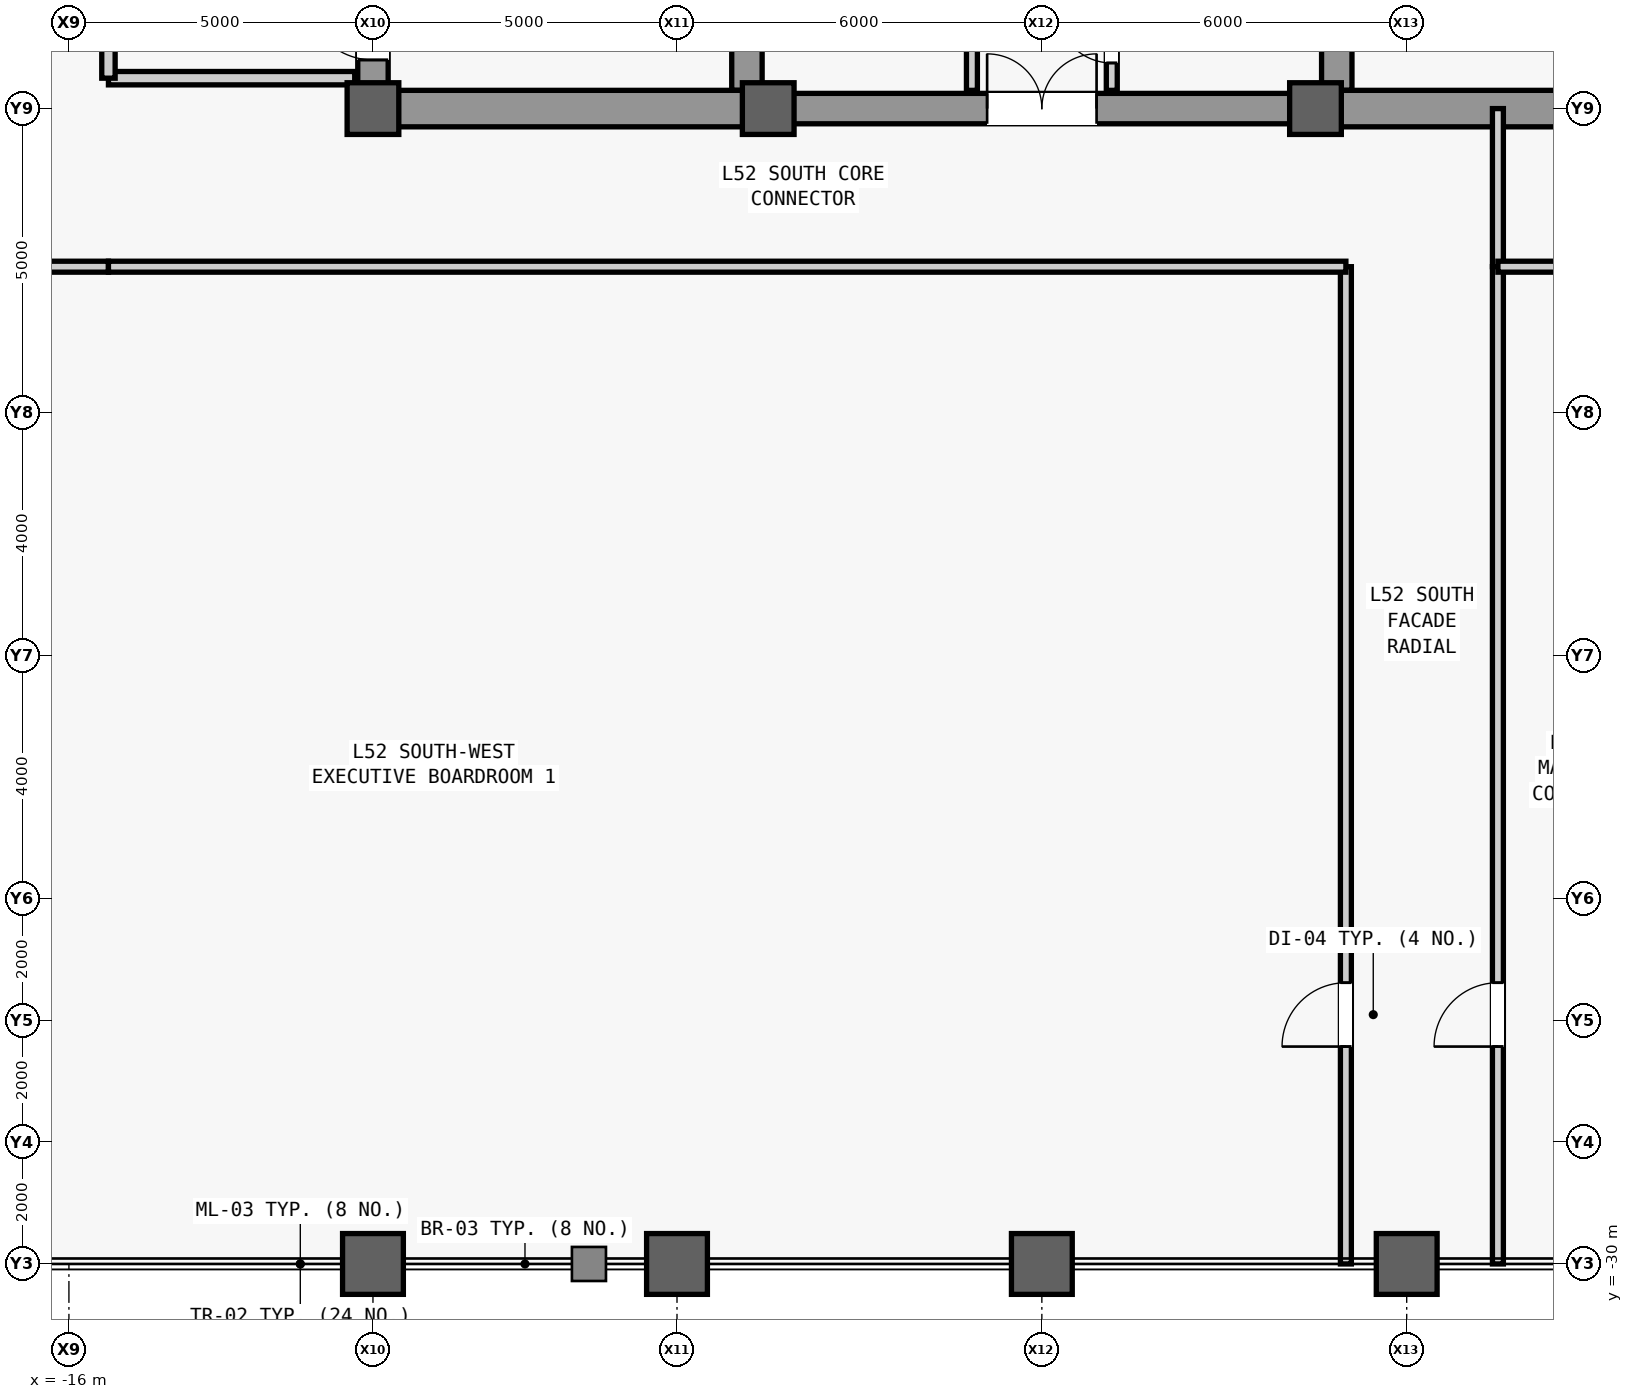
"""IFC4 building model, lengths in metres.
Left out: names, types, materials, properties, quantities, classifications, styles, units other than length and angle.
Written with IfcOpenShell. Run it as: python <this file> out.ifc"""

import sys

from ifc_helpers import new_model, si_unit, direction, frame, frame_2d, origin, origin_2d, place, context, subcontext, project, spatial, rectangle, hollow_rectangle, extrude, source, transform, mapped, element, fill, save


model = new_model("IFC4")
c1 = context("Model", 3, precision=1e-05, world=origin(), true_north=direction((0.0, 1.0)))
c2 = subcontext(c1, "Body", "Model", "MODEL_VIEW")
j1 = project(units=[si_unit("LENGTHUNIT", "METRE"), si_unit("PLANEANGLEUNIT", "RADIAN")], contexts=[c1])
p1 = place(None, origin())
s1 = spatial("IfcSite", under=j1, at=p1, CompositionType="ELEMENT")
p2 = place(p1, origin())
s2 = spatial("IfcBuilding", under=s1, at=p2, CompositionType="ELEMENT")
p3 = place(p2, frame((0.0, 0.0, 223.1)))
s3 = spatial("IfcBuildingStorey", under=s2, at=p3, CompositionType="ELEMENT", Elevation=223.1)
m1 = source(origin(), c2, "Body", "SweptSolid", [
    extrude(rectangle(XDim=22.0, YDim=0.5, at=frame_2d((11.0, 0.0))), origin(), (0.0, 0.0, 1.0), 3.78),
])
p4 = place(p3, frame((-11.0, -11.0, 0.0), z_axis=(0.0, 0.0, 1.0), x_axis=(0.0, 1.0, 0.0)))
e1 = element("IfcWall", 1, at=p4, inside=s3, PredefinedType="SHEAR", context=c2, shape_type="MappedRepresentation", body=[
    mapped(m1, transform((0.0, 0.0, 0.0), scale=1.0)),
])
m2 = source(origin(), c2, "Body", "SweptSolid", [
    extrude(rectangle(XDim=1.1, YDim=2.2, at=frame_2d((0.55, 1.1))), frame((0.0, 0.26, 0.0), z_axis=(0.0, -1.0, 0.0), x_axis=(1.0, 0.0, 0.0)), (0.0, 0.0, 1.0), 0.52),
])
p5 = place(p4, frame((0.8, 0.0, 0.0)))
e2 = element("IfcOpeningElement", 2, at=p5, cuts=e1, PredefinedType="OPENING", context=c2, shape_type="MappedRepresentation", body=[
    mapped(m2, transform((0.0, 0.0, 0.0), scale=1.0)),
])
p6 = place(p4, frame((12.5, 0.0, 0.0)))
e3 = element("IfcOpeningElement", 3, at=p6, cuts=e1, PredefinedType="OPENING", context=c2, shape_type="MappedRepresentation", body=[
    mapped(m2, transform((0.0, 0.0, 0.0), scale=1.0)),
])
m3 = source(origin(), c2, "Body", "SweptSolid", [
    extrude(rectangle(XDim=0.9, YDim=2.15, at=frame_2d((0.45, 1.075))), frame((0.0, 0.26, 0.0), z_axis=(0.0, -1.0, 0.0), x_axis=(1.0, 0.0, 0.0)), (0.0, 0.0, 1.0), 0.52),
])
p7 = place(p4, frame((6.2, 0.0, 0.0)))
e4 = element("IfcOpeningElement", 4, at=p7, cuts=e1, PredefinedType="OPENING", context=c2, shape_type="MappedRepresentation", body=[
    mapped(m3, transform((0.0, 0.0, 0.0), scale=1.0)),
])
p8 = place(p4, frame((8.05, 0.0, 0.0)))
e5 = element("IfcOpeningElement", 5, at=p8, cuts=e1, PredefinedType="OPENING", context=c2, shape_type="MappedRepresentation", body=[
    mapped(m3, transform((0.0, 0.0, 0.0), scale=1.0)),
])
m4 = source(origin(), c2, "Body", "SweptSolid", [
    extrude(rectangle(XDim=1.3, YDim=2.3, at=frame_2d((0.65, 1.15))), frame((0.0, 0.26, 0.0), z_axis=(0.0, -1.0, 0.0), x_axis=(1.0, 0.0, 0.0)), (0.0, 0.0, 1.0), 0.52),
])
p9 = place(p4, frame((2.7, 0.0, 0.0)))
e6 = element("IfcOpeningElement", 6, at=p9, cuts=e1, PredefinedType="OPENING", context=c2, shape_type="MappedRepresentation", body=[
    mapped(m4, transform((0.0, 0.0, 0.0), scale=1.0)),
])
m5 = source(origin(), c2, "Body", "SweptSolid", [
    extrude(rectangle(XDim=21.4, YDim=0.5, at=frame_2d((10.7, 0.0))), origin(), (0.0, 0.0, 1.0), 3.78),
])
for number, where, z_axis, x_axis in (
    (7, (-4.85, -10.7, 0.0), (0.0, 0.0, 1.0), (0.0, 1.0, 0.0)),
    (8, (4.85, -10.7, 0.0), (0.0, 0.0, 1.0), (0.0, 1.0, 0.0)),
):
    element("IfcWall", number, at=place(p3, frame(where, z_axis=z_axis, x_axis=x_axis)), inside=s3, PredefinedType="SHEAR", context=c2, shape_type="MappedRepresentation", body=[
        mapped(m5, transform((0.0, 0.0, 0.0), scale=1.0)),
    ])
m6 = source(origin(), c2, "Body", "SweptSolid", [
    extrude(rectangle(XDim=5.9, YDim=0.6, at=frame_2d((2.95, 0.0))), origin(), (0.0, 0.0, 1.0), 3.78),
])
for number, where, z_axis, x_axis in (
    (9, (-10.75, -11.0, 0.0), (0.0, 0.0, 1.0), (1.0, 0.0, 0.0)),
    (10, (4.85, -11.0, 0.0), (0.0, 0.0, 1.0), (1.0, 0.0, 0.0)),
):
    element("IfcWall", number, at=place(p3, frame(where, z_axis=z_axis, x_axis=x_axis)), inside=s3, PredefinedType="SHEAR", context=c2, shape_type="MappedRepresentation", body=[
        mapped(m6, transform((0.0, 0.0, 0.0), scale=1.0)),
    ])
m7 = source(origin(), c2, "Body", "SweptSolid", [
    extrude(rectangle(XDim=9.2, YDim=0.5, at=frame_2d((4.6, 0.0))), origin(), (0.0, 0.0, 1.0), 3.78),
])
p10 = place(p3, frame((-4.6, -11.0, 0.0), z_axis=(0.0, 0.0, 1.0), x_axis=(1.0, 0.0, 0.0)))
e11 = element("IfcWall", 11, at=p10, inside=s3, PredefinedType="SHEAR", context=c2, shape_type="MappedRepresentation", body=[
    mapped(m7, transform((0.0, 0.0, 0.0), scale=1.0)),
])
m8 = source(origin(), c2, "Body", "SweptSolid", [
    extrude(rectangle(XDim=1.8, YDim=2.25, at=frame_2d((0.9, 1.125))), frame((0.0, 0.26, 0.0), z_axis=(0.0, -1.0, 0.0), x_axis=(1.0, 0.0, 0.0)), (0.0, 0.0, 1.0), 0.52),
])
p11 = place(p10, frame((3.7, 0.0, 0.0)))
e12 = element("IfcOpeningElement", 12, at=p11, cuts=e11, PredefinedType="OPENING", context=c2, shape_type="MappedRepresentation", body=[
    mapped(m8, transform((0.0, 0.0, 0.0), scale=1.0)),
])
m9 = source(origin(), c2, "Body", "SweptSolid", [
    extrude(hollow_rectangle(XDim=1.0, YDim=1.0, WallThickness=0.055, at=origin_2d()), origin(), (0.0, 0.0, 1.0), 4.0),
])
p12 = place(p3, frame((-11.0, -30.0, 0.0), z_axis=(0.0, 0.0, 1.0), x_axis=(1.0, 0.0, 0.0)))
e13 = element("IfcColumn", 13, at=p12, inside=s3, PredefinedType="COLUMN", context=c2, shape_type="MappedRepresentation", body=[
    mapped(m9, transform((0.0, 0.0, 0.0), scale=1.0)),
])
m10 = source(origin(), c2, "Body", "SweptSolid", [
    extrude(rectangle(XDim=0.85, YDim=0.85, at=origin_2d()), origin(), (0.0, 0.0, 1.0), 4.0),
])
p13 = place(p3, frame((-11.0, -11.0, 0.0), z_axis=(0.0, 0.0, 1.0), x_axis=(1.0, 0.0, 0.0)))
e14 = element("IfcColumn", 14, at=p13, inside=s3, PredefinedType="COLUMN", context=c2, shape_type="MappedRepresentation", body=[
    mapped(m10, transform((0.0, 0.0, 0.0), scale=1.0)),
])
p14 = place(p3, frame((-6.0, -30.0, 0.0), z_axis=(0.0, 0.0, 1.0), x_axis=(1.0, 0.0, 0.0)))
e15 = element("IfcColumn", 15, at=p14, inside=s3, PredefinedType="COLUMN", context=c2, shape_type="MappedRepresentation", body=[
    mapped(m9, transform((0.0, 0.0, 0.0), scale=1.0)),
])
p15 = place(p3, frame((-4.5, -11.0, 0.0), z_axis=(0.0, 0.0, 1.0), x_axis=(1.0, 0.0, 0.0)))
e16 = element("IfcColumn", 16, at=p15, inside=s3, PredefinedType="COLUMN", context=c2, shape_type="MappedRepresentation", body=[
    mapped(m10, transform((0.0, 0.0, 0.0), scale=1.0)),
])
p16 = place(p3, frame((0.0, -30.0, 0.0), z_axis=(0.0, 0.0, 1.0), x_axis=(1.0, 0.0, 0.0)))
e17 = element("IfcColumn", 17, at=p16, inside=s3, PredefinedType="COLUMN", context=c2, shape_type="MappedRepresentation", body=[
    mapped(m9, transform((0.0, 0.0, 0.0), scale=1.0)),
])
p17 = place(p3, frame((4.5, -11.0, 0.0), z_axis=(0.0, 0.0, 1.0), x_axis=(1.0, 0.0, 0.0)))
e18 = element("IfcColumn", 18, at=p17, inside=s3, PredefinedType="COLUMN", context=c2, shape_type="MappedRepresentation", body=[
    mapped(m10, transform((0.0, 0.0, 0.0), scale=1.0)),
])
p18 = place(p3, frame((6.0, -30.0, 0.0), z_axis=(0.0, 0.0, 1.0), x_axis=(1.0, 0.0, 0.0)))
e19 = element("IfcColumn", 19, at=p18, inside=s3, PredefinedType="COLUMN", context=c2, shape_type="MappedRepresentation", body=[
    mapped(m9, transform((0.0, 0.0, 0.0), scale=1.0)),
])
m11 = source(origin(), c2, "Body", "SweptSolid", [
    extrude(rectangle(XDim=4.05, YDim=0.22, at=frame_2d((2.025, 0.0))), origin(), (0.0, 0.0, 1.0), 3.78),
])
p19 = place(p3, frame((-15.35, -10.5, 0.0), z_axis=(0.0, 0.0, 1.0), x_axis=(1.0, 0.0, 0.0)))
e20 = element("IfcWall", 20, at=p19, inside=s3, PredefinedType="PARTITIONING", context=c2, shape_type="MappedRepresentation", body=[
    mapped(m11, transform((0.0, 0.0, 0.0), scale=1.0)),
])
m12 = source(origin(), c2, "Body", "SweptSolid", [
    extrude(rectangle(XDim=4.4, YDim=0.22, at=frame_2d((2.2, 0.0))), origin(), (0.0, 0.0, 1.0), 3.78),
])
p20 = place(p3, frame((-15.35, -10.5, 0.0), z_axis=(0.0, 0.0, 1.0), x_axis=(0.0, 1.0, 0.0)))
e21 = element("IfcWall", 21, at=p20, inside=s3, PredefinedType="PARTITIONING", context=c2, shape_type="MappedRepresentation", body=[
    mapped(m12, transform((0.0, 0.0, 0.0), scale=1.0)),
])
m13 = source(origin(), c2, "Body", "SweptSolid", [
    extrude(rectangle(XDim=1.2, YDim=2.2, at=frame_2d((0.6, 1.1))), frame((0.0, 0.12, 0.0), z_axis=(0.0, -1.0, 0.0), x_axis=(1.0, 0.0, 0.0)), (0.0, 0.0, 1.0), 0.24),
])
p21 = place(p20, frame((1.6, 0.0, 0.0)))
e22 = element("IfcOpeningElement", 22, at=p21, cuts=e21, PredefinedType="OPENING", context=c2, shape_type="MappedRepresentation", body=[
    mapped(m13, transform((0.0, 0.0, 0.0), scale=1.0)),
])
m14 = source(origin(), c2, "Body", "SweptSolid", [
    extrude(rectangle(XDim=5.4, YDim=0.18, at=frame_2d((2.7, 0.0))), origin(), (0.0, 0.0, 1.0), 3.78),
])
p22 = place(p3, frame((-1.15, -10.7, 0.0), z_axis=(0.0, 0.0, 1.0), x_axis=(0.0, 1.0, 0.0)))
e23 = element("IfcWall", 23, at=p22, inside=s3, PredefinedType="PARTITIONING", context=c2, shape_type="MappedRepresentation", body=[
    mapped(m14, transform((0.0, 0.0, 0.0), scale=1.0)),
])
m15 = source(origin(), c2, "Body", "SweptSolid", [
    extrude(rectangle(XDim=0.9, YDim=2.15, at=frame_2d((0.45, 1.075))), frame((0.0, 0.1, 0.0), z_axis=(0.0, -1.0, 0.0), x_axis=(1.0, 0.0, 0.0)), (0.0, 0.0, 1.0), 0.2),
])
p23 = place(p22, frame((2.25, 0.0, 0.0)))
e24 = element("IfcOpeningElement", 24, at=p23, cuts=e23, PredefinedType="OPENING", context=c2, shape_type="MappedRepresentation", body=[
    mapped(m15, transform((0.0, 0.0, 0.0), scale=1.0)),
])
p24 = place(p3, frame((1.15, -10.7, 0.0), z_axis=(0.0, 0.0, 1.0), x_axis=(0.0, 1.0, 0.0)))
e25 = element("IfcWall", 25, at=p24, inside=s3, PredefinedType="PARTITIONING", context=c2, shape_type="MappedRepresentation", body=[
    mapped(m14, transform((0.0, 0.0, 0.0), scale=1.0)),
])
p25 = place(p24, frame((0.45, 0.0, 0.0)))
e26 = element("IfcOpeningElement", 26, at=p25, cuts=e25, PredefinedType="OPENING", context=c2, shape_type="MappedRepresentation", body=[
    mapped(m15, transform((0.0, 0.0, 0.0), scale=1.0)),
])
p26 = place(p24, frame((2.25, 0.0, 0.0)))
e27 = element("IfcOpeningElement", 27, at=p26, cuts=e25, PredefinedType="OPENING", context=c2, shape_type="MappedRepresentation", body=[
    mapped(m15, transform((0.0, 0.0, 0.0), scale=1.0)),
])
p27 = place(p24, frame((4.05, 0.0, 0.0)))
e28 = element("IfcOpeningElement", 28, at=p27, cuts=e25, PredefinedType="OPENING", context=c2, shape_type="MappedRepresentation", body=[
    mapped(m15, transform((0.0, 0.0, 0.0), scale=1.0)),
])
m16 = source(origin(), c2, "Body", "SweptSolid", [
    extrude(rectangle(XDim=2.45, YDim=0.18, at=frame_2d((1.225, 0.0))), origin(), (0.0, 0.0, 1.0), 3.78),
])
p28 = place(p3, frame((-17.8, -13.6, 0.0), z_axis=(0.0, 0.0, 1.0), x_axis=(1.0, 0.0, 0.0)))
e29 = element("IfcWall", 29, at=p28, inside=s3, PredefinedType="PARTITIONING", context=c2, shape_type="MappedRepresentation", body=[
    mapped(m16, transform((0.0, 0.0, 0.0), scale=1.0)),
])
m17 = source(origin(), c2, "Body", "SweptSolid", [
    extrude(rectangle(XDim=2.6, YDim=0.18, at=frame_2d((1.3, 0.0))), origin(), (0.0, 0.0, 1.0), 3.78),
])
p29 = place(p3, frame((7.5, -13.6, 0.0), z_axis=(0.0, 0.0, 1.0), x_axis=(0.0, 1.0, 0.0)))
e30 = element("IfcWall", 30, at=p29, inside=s3, PredefinedType="PARTITIONING", context=c2, shape_type="MappedRepresentation", body=[
    mapped(m17, transform((0.0, 0.0, 0.0), scale=1.0)),
])
m18 = source(origin(), c2, "Body", "SweptSolid", [
    extrude(rectangle(XDim=16.4, YDim=0.18, at=frame_2d((8.2, 0.0))), origin(), (0.0, 0.0, 1.0), 3.78),
])
p30 = place(p3, frame((5.0, -30.0, 0.0), z_axis=(0.0, 0.0, 1.0), x_axis=(0.0, 1.0, 0.0)))
e31 = element("IfcWall", 31, at=p30, inside=s3, PredefinedType="PARTITIONING", context=c2, shape_type="MappedRepresentation", body=[
    mapped(m18, transform((0.0, 0.0, 0.0), scale=1.0)),
])
m19 = source(origin(), c2, "Body", "SweptSolid", [
    extrude(rectangle(XDim=1.05, YDim=2.2, at=frame_2d((0.525, 1.1))), frame((0.0, 0.1, 0.0), z_axis=(0.0, -1.0, 0.0), x_axis=(1.0, 0.0, 0.0)), (0.0, 0.0, 1.0), 0.2),
])
p31 = place(p30, frame((3.575, 0.0, 0.0)))
e32 = element("IfcOpeningElement", 32, at=p31, cuts=e31, PredefinedType="OPENING", context=c2, shape_type="MappedRepresentation", body=[
    mapped(m19, transform((0.0, 0.0, 0.0), scale=1.0)),
])
m20 = source(origin(), c2, "Body", "SweptSolid", [
    extrude(rectangle(XDim=20.35, YDim=0.18, at=frame_2d((10.175, 0.0))), origin(), (0.0, 0.0, 1.0), 3.78),
])
p32 = place(p3, frame((-15.35, -13.6, 0.0), z_axis=(0.0, 0.0, 1.0), x_axis=(1.0, 0.0, 0.0)))
e33 = element("IfcWall", 33, at=p32, inside=s3, PredefinedType="PARTITIONING", context=c2, shape_type="MappedRepresentation", body=[
    mapped(m20, transform((0.0, 0.0, 0.0), scale=1.0)),
])
p33 = place(p3, frame((7.5, -30.0, 0.0), z_axis=(0.0, 0.0, 1.0), x_axis=(0.0, 1.0, 0.0)))
e34 = element("IfcWall", 34, at=p33, inside=s3, PredefinedType="PARTITIONING", context=c2, shape_type="MappedRepresentation", body=[
    mapped(m18, transform((0.0, 0.0, 0.0), scale=1.0)),
])
p34 = place(p33, frame((3.575, 0.0, 0.0)))
e35 = element("IfcOpeningElement", 35, at=p34, cuts=e34, PredefinedType="OPENING", context=c2, shape_type="MappedRepresentation", body=[
    mapped(m19, transform((0.0, 0.0, 0.0), scale=1.0)),
])
m21 = source(origin(), c2, "Body", "SweptSolid", [
    extrude(rectangle(XDim=7.85, YDim=0.18, at=frame_2d((3.925, 0.0))), origin(), (0.0, 0.0, 1.0), 3.78),
])
p35 = place(p3, frame((7.5, -13.6, 0.0), z_axis=(0.0, 0.0, 1.0), x_axis=(1.0, 0.0, 0.0)))
e36 = element("IfcWall", 36, at=p35, inside=s3, PredefinedType="PARTITIONING", context=c2, shape_type="MappedRepresentation", body=[
    mapped(m21, transform((0.0, 0.0, 0.0), scale=1.0)),
])
m22 = source(origin(), c2, "Body", "SweptSolid", [
    extrude(rectangle(XDim=1.1, YDim=2.2, at=frame_2d((0.55, 1.1))), frame((0.0, 0.025, 0.0), z_axis=(0.0, -1.0, 0.0), x_axis=(1.0, 0.0, 0.0)), (0.0, 0.0, 1.0), 0.05),
])
p36 = place(p5, origin())
e37 = element("IfcDoor", 37, at=p36, inside=s3, OperationType="SINGLE_SWING_RIGHT", PredefinedType="DOOR", context=c2, shape_type="MappedRepresentation", body=[
    mapped(m22, transform((0.0, 0.0, 0.0), scale=1.0)),
])
fill(e2, e37)
m23 = source(origin(), c2, "Body", "SweptSolid", [
    extrude(rectangle(XDim=0.9, YDim=2.15, at=frame_2d((0.45, 1.075))), frame((0.0, 0.025, 0.0), z_axis=(0.0, -1.0, 0.0), x_axis=(1.0, 0.0, 0.0)), (0.0, 0.0, 1.0), 0.05),
])
p37 = place(p25, origin())
e38 = element("IfcDoor", 38, at=p37, inside=s3, OperationType="SINGLE_SWING_RIGHT", PredefinedType="DOOR", context=c2, shape_type="MappedRepresentation", body=[
    mapped(m23, transform((0.0, 0.0, 0.0), scale=1.0)),
])
fill(e26, e38)
m24 = source(origin(), c2, "Body", "SweptSolid", [
    extrude(rectangle(XDim=1.8, YDim=2.25, at=frame_2d((0.9, 1.125))), frame((0.0, 0.025, 0.0), z_axis=(0.0, -1.0, 0.0), x_axis=(1.0, 0.0, 0.0)), (0.0, 0.0, 1.0), 0.05),
])
p38 = place(p11, origin())
e39 = element("IfcDoor", 39, at=p38, inside=s3, OperationType="SINGLE_SWING_LEFT", PredefinedType="DOOR", context=c2, shape_type="MappedRepresentation", body=[
    mapped(m24, transform((0.0, 0.0, 0.0), scale=1.0)),
])
fill(e12, e39)
m25 = source(origin(), c2, "Body", "SweptSolid", [
    extrude(rectangle(XDim=1.05, YDim=2.2, at=frame_2d((0.525, 1.1))), frame((0.0, 0.025, 0.0), z_axis=(0.0, -1.0, 0.0), x_axis=(1.0, 0.0, 0.0)), (0.0, 0.0, 1.0), 0.05),
])
p39 = place(p31, origin())
e40 = element("IfcDoor", 40, at=p39, inside=s3, OperationType="SINGLE_SWING_LEFT", PredefinedType="DOOR", context=c2, shape_type="MappedRepresentation", body=[
    mapped(m25, transform((0.0, 0.0, 0.0), scale=1.0)),
])
fill(e32, e40)
p40 = place(p34, origin())
e41 = element("IfcDoor", 41, at=p40, inside=s3, OperationType="SINGLE_SWING_LEFT", PredefinedType="DOOR", context=c2, shape_type="MappedRepresentation", body=[
    mapped(m25, transform((0.0, 0.0, 0.0), scale=1.0)),
])
fill(e35, e41)
save(model, sys.argv[1])
